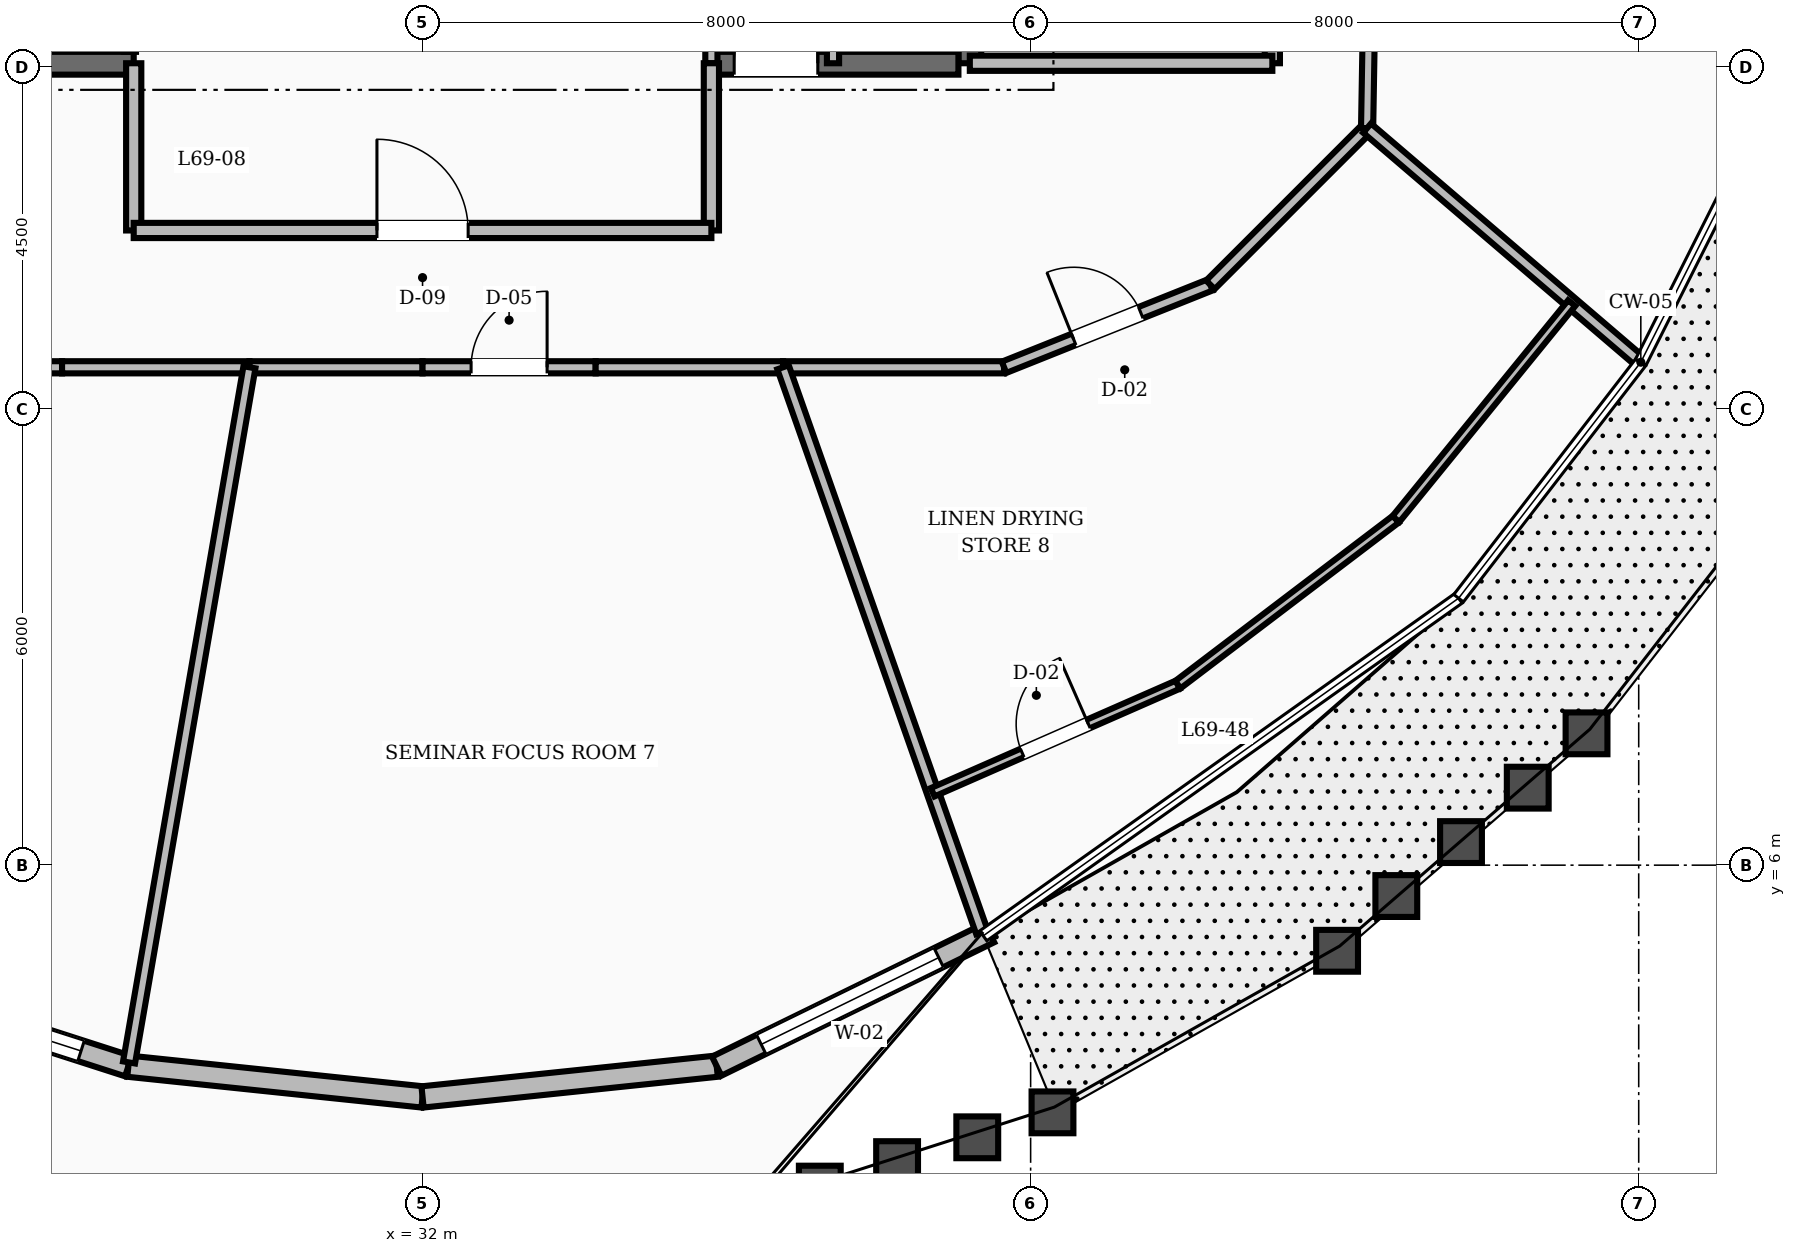
"""IFC4 building model, lengths in metres.
Left out: names, types, materials, properties, quantities, classifications, styles, units other than length and angle.
Written with IfcOpenShell. Run it as: python <this file> out.ifc"""

import sys

from ifc_helpers import new_model, si_unit, direction, frame, frame_2d, origin, place, context, subcontext, project, spatial, rectangle, extrude, element, fill, save


model = new_model("IFC4")
c1 = context("Model", 3, precision=1e-05, world=origin(), true_north=direction((0.0, 1.0)))
c2 = subcontext(c1, "Body", "Model", "MODEL_VIEW")
j1 = project(units=[si_unit("LENGTHUNIT", "METRE"), si_unit("PLANEANGLEUNIT", "RADIAN")], contexts=[c1])
p1 = place(None, origin())
s1 = spatial("IfcSite", under=j1, at=p1, CompositionType="ELEMENT")
p2 = place(p1, origin())
s2 = spatial("IfcBuilding", under=s1, at=p2, CompositionType="ELEMENT")
p3 = place(p2, frame((0.0, 0.0, 265.2)))
s3 = spatial("IfcBuildingStorey", under=s2, at=p3, CompositionType="ELEMENT", Elevation=265.2)
p4 = place(p3, frame((39.2, 16.55, 0.0), z_axis=(0.0, 0.0, 1.0), x_axis=(0.0, 1.0, 0.0)))
e1 = element("IfcWall", 1, at=p4, inside=s3, PredefinedType="SHEAR", context=c2, shape_type="SweptSolid", body=[
    extrude(rectangle(XDim=6.3, YDim=0.3, at=frame_2d((3.15, 0.0))), origin(), (0.0, 0.0, 1.0), 3.6),
])
p5 = place(p3, frame((24.95, 16.55, 0.0), z_axis=(0.0, 0.0, 1.0), x_axis=(1.0, 0.0, 0.0)))
e2 = element("IfcWall", 2, at=p5, inside=s3, PredefinedType="SHEAR", context=c2, shape_type="SweptSolid", body=[
    extrude(rectangle(XDim=3.25, YDim=0.3, at=frame_2d((1.625, 0.0))), origin(), (0.0, 0.0, 1.0), 3.6),
])
p6 = place(p3, frame((35.8, 16.55, 0.0), z_axis=(0.0, 0.0, 1.0), x_axis=(1.0, 0.0, 0.0)))
e3 = element("IfcWall", 3, at=p6, inside=s3, PredefinedType="SHEAR", context=c2, shape_type="SweptSolid", body=[
    extrude(rectangle(XDim=3.25, YDim=0.3, at=frame_2d((1.625, 0.0))), origin(), (0.0, 0.0, 1.0), 3.6),
])
p7 = place(p6, frame((0.3, 0.0, 0.0)))
e4 = element("IfcOpeningElement", 4, at=p7, cuts=e3, PredefinedType="OPENING", context=c2, shape_type="SweptSolid", body=[
    extrude(rectangle(XDim=1.1, YDim=2.1, at=frame_2d((0.55, 1.05))), frame((0.0, 0.16, 0.0), z_axis=(0.0, -1.0, 0.0), x_axis=(1.0, 0.0, 0.0)), (0.0, 0.0, 1.0), 0.32),
])
p8 = place(p3, frame((24.409, 4.553, 0.0), z_axis=(0.0, 0.0, 1.0), x_axis=(0.951905022268, -0.306393258053, 0.0)))
e5 = element("IfcWall", 5, at=p8, inside=s3, PredefinedType="STANDARD", context=c2, shape_type="SweptSolid", body=[
    extrude(rectangle(XDim=3.909, YDim=0.28, at=frame_2d((1.955, 0.0))), origin(), (0.0, 0.0, 1.0), 2.88),
])
p9 = place(p8, frame((0.655, 0.0, 0.8)))
e6 = element("IfcOpeningElement", 6, at=p9, cuts=e5, PredefinedType="OPENING", context=c2, shape_type="SweptSolid", body=[
    extrude(rectangle(XDim=2.6, YDim=1.65, at=frame_2d((1.3, 0.825))), frame((0.0, 0.15, 0.0), z_axis=(0.0, -1.0, 0.0), x_axis=(1.0, 0.0, 0.0)), (0.0, 0.0, 1.0), 0.3),
])
for number, where, z_axis, x_axis in (
    (7, (28.13, 3.355, 0.0), (0.0, 0.0, 1.0), (0.995, -0.104, 0.0)),
    (8, (32.0, 2.951, 0.0), (0.0, 0.0, 1.0), (0.995, 0.104, 0.0)),
):
    element("IfcWall", number, at=place(p3, frame(where, z_axis=z_axis, x_axis=x_axis)), inside=s3, PredefinedType="STANDARD", context=c2, shape_type="SweptSolid", body=[
        extrude(rectangle(XDim=3.891, YDim=0.28, at=frame_2d((1.945, 0.0))), origin(), (0.0, 0.0, 1.0), 2.88),
    ])
p10 = place(p3, frame((35.87, 3.355, 0.0), z_axis=(0.0, 0.0, 1.0), x_axis=(0.898339353793, 0.439302180084, 0.0)))
e9 = element("IfcWall", 9, at=p10, inside=s3, PredefinedType="STANDARD", context=c2, shape_type="SweptSolid", body=[
    extrude(rectangle(XDim=3.996, YDim=0.28, at=frame_2d((1.998, 0.0))), origin(), (0.0, 0.0, 1.0), 2.88),
])
p11 = place(p10, frame((0.652, 0.0, 0.8)))
e10 = element("IfcOpeningElement", 10, at=p11, cuts=e9, PredefinedType="OPENING", context=c2, shape_type="SweptSolid", body=[
    extrude(rectangle(XDim=2.6, YDim=1.65, at=frame_2d((1.3, 0.825))), frame((0.0, 0.15, 0.0), z_axis=(0.0, -1.0, 0.0), x_axis=(1.0, 0.0, 0.0)), (0.0, 0.0, 1.0), 0.3),
])
p12 = place(p3, frame((43.18, 16.55, 0.0), z_axis=(0.0, 0.0, 1.0), x_axis=(0.0, 1.0, 0.0)))
e11 = element("IfcWall", 11, at=p12, inside=s3, PredefinedType="SOLIDWALL", context=c2, shape_type="SweptSolid", body=[
    extrude(rectangle(XDim=2.73, YDim=0.2, at=frame_2d((1.365, 0.0))), origin(), (0.0, 0.0, 1.0), 2.87),
])
p13 = place(p12, frame((0.89, 0.0, 0.0)))
e12 = element("IfcOpeningElement", 12, at=p13, cuts=e11, PredefinedType="OPENING", context=c2, shape_type="SweptSolid", body=[
    extrude(rectangle(XDim=0.95, YDim=2.1, at=frame_2d((0.475, 1.05))), frame((0.0, 0.11, 0.0), z_axis=(0.0, -1.0, 0.0), x_axis=(1.0, 0.0, 0.0)), (0.0, 0.0, 1.0), 0.22),
])
p14 = place(p3, frame((39.2, 16.55, 0.0), z_axis=(0.0, 0.0, 1.0), x_axis=(1.0, 0.0, 0.0)))
e13 = element("IfcWall", 13, at=p14, inside=s3, PredefinedType="SOLIDWALL", context=c2, shape_type="SweptSolid", body=[
    extrude(rectangle(XDim=3.98, YDim=0.2, at=frame_2d((1.99, 0.0))), origin(), (0.0, 0.0, 1.0), 2.87),
])
p15 = place(p3, frame((35.8, 16.55, 0.0), z_axis=(0.0, 0.0, 1.0), x_axis=(0.0, 1.0, 0.0)))
e14 = element("IfcWall", 14, at=p15, inside=s3, PredefinedType="SOLIDWALL", context=c2, shape_type="SweptSolid", body=[
    extrude(rectangle(XDim=3.3, YDim=0.16, at=frame_2d((1.65, 0.0))), origin(), (0.0, 0.0, 1.0), 2.87),
])
p16 = place(p3, frame((37.4, 16.55, 0.0), z_axis=(0.0, 0.0, 1.0), x_axis=(0.0, 1.0, 0.0)))
e15 = element("IfcWall", 15, at=p16, inside=s3, PredefinedType="SOLIDWALL", context=c2, shape_type="SweptSolid", body=[
    extrude(rectangle(XDim=1.75, YDim=0.16, at=frame_2d((0.875, 0.0))), origin(), (0.0, 0.0, 1.0), 2.87),
])
for number, where, z_axis, x_axis in (
    (16, (28.2, 14.35, 0.0), (0.0, 0.0, 1.0), (0.0, 1.0, 0.0)),
    (17, (35.8, 14.35, 0.0), (0.0, 0.0, 1.0), (0.0, 1.0, 0.0)),
):
    element("IfcWall", number, at=place(p3, frame(where, z_axis=z_axis, x_axis=x_axis)), inside=s3, PredefinedType="SOLIDWALL", context=c2, shape_type="SweptSolid", body=[
        extrude(rectangle(XDim=2.2, YDim=0.2, at=frame_2d((1.1, 0.0))), origin(), (0.0, 0.0, 1.0), 2.87),
    ])
p17 = place(p3, frame((28.2, 14.35, 0.0), z_axis=(0.0, 0.0, 1.0), x_axis=(1.0, 0.0, 0.0)))
e18 = element("IfcWall", 18, at=p17, inside=s3, PredefinedType="SOLIDWALL", context=c2, shape_type="SweptSolid", body=[
    extrude(rectangle(XDim=7.6, YDim=0.2, at=frame_2d((3.8, 0.0))), origin(), (0.0, 0.0, 1.0), 2.87),
])
p18 = place(p17, frame((3.2, 0.0, 0.0)))
e19 = element("IfcOpeningElement", 19, at=p18, cuts=e18, PredefinedType="OPENING", context=c2, shape_type="SweptSolid", body=[
    extrude(rectangle(XDim=1.2, YDim=2.1, at=frame_2d((0.6, 1.05))), frame((0.0, 0.11, 0.0), z_axis=(0.0, -1.0, 0.0), x_axis=(1.0, 0.0, 0.0)), (0.0, 0.0, 1.0), 0.22),
])
p19 = place(p3, frame((24.349, 12.55, 0.0), z_axis=(0.0, 0.0, 1.0), x_axis=(1.0, 0.0, 0.0)))
e20 = element("IfcWall", 20, at=p19, inside=s3, PredefinedType="SOLIDWALL", context=c2, shape_type="SweptSolid", body=[
    extrude(rectangle(XDim=2.908, YDim=0.16, at=frame_2d((1.454, 0.0))), origin(), (0.0, 0.0, 1.0), 2.87),
])
p20 = place(p19, frame((0.954, 0.0, 0.0)))
e21 = element("IfcOpeningElement", 21, at=p20, cuts=e20, PredefinedType="OPENING", context=c2, shape_type="SweptSolid", body=[
    extrude(rectangle(XDim=1.0, YDim=2.1, at=frame_2d((0.5, 1.05))), frame((0.0, 0.09, 0.0), z_axis=(0.0, -1.0, 0.0), x_axis=(1.0, 0.0, 0.0)), (0.0, 0.0, 1.0), 0.18),
])
p21 = place(p3, frame((27.257, 12.55, 0.0), z_axis=(0.0, 0.0, 1.0), x_axis=(1.0, 0.0, 0.0)))
e22 = element("IfcWall", 22, at=p21, inside=s3, PredefinedType="SOLIDWALL", context=c2, shape_type="SweptSolid", body=[
    extrude(rectangle(XDim=2.465, YDim=0.16, at=frame_2d((1.232, 0.0))), origin(), (0.0, 0.0, 1.0), 2.87),
])
p22 = place(p3, frame((29.722, 12.55, 0.0), z_axis=(0.0, 0.0, 1.0), x_axis=(1.0, 0.0, 0.0)))
e23 = element("IfcWall", 23, at=p22, inside=s3, PredefinedType="SOLIDWALL", context=c2, shape_type="SweptSolid", body=[
    extrude(rectangle(XDim=2.278, YDim=0.16, at=frame_2d((1.139, 0.0))), origin(), (0.0, 0.0, 1.0), 2.87),
])
p23 = place(p3, frame((32.0, 12.55, 0.0), z_axis=(0.0, 0.0, 1.0), x_axis=(1.0, 0.0, 0.0)))
e24 = element("IfcWall", 24, at=p23, inside=s3, PredefinedType="SOLIDWALL", context=c2, shape_type="SweptSolid", body=[
    extrude(rectangle(XDim=2.278, YDim=0.16, at=frame_2d((1.139, 0.0))), origin(), (0.0, 0.0, 1.0), 2.87),
])
p24 = place(p23, frame((0.639, 0.0, 0.0)))
e25 = element("IfcOpeningElement", 25, at=p24, cuts=e24, PredefinedType="OPENING", context=c2, shape_type="SweptSolid", body=[
    extrude(rectangle(XDim=1.0, YDim=2.1, at=frame_2d((0.5, 1.05))), frame((0.0, 0.09, 0.0), z_axis=(0.0, -1.0, 0.0), x_axis=(1.0, 0.0, 0.0)), (0.0, 0.0, 1.0), 0.18),
])
p25 = place(p3, frame((34.278, 12.55, 0.0), z_axis=(0.0, 0.0, 1.0), x_axis=(1.0, 0.0, 0.0)))
e26 = element("IfcWall", 26, at=p25, inside=s3, PredefinedType="SOLIDWALL", context=c2, shape_type="SweptSolid", body=[
    extrude(rectangle(XDim=2.465, YDim=0.16, at=frame_2d((1.232, 0.0))), origin(), (0.0, 0.0, 1.0), 2.87),
])
p26 = place(p3, frame((36.743, 12.55, 0.0), z_axis=(0.0, 0.0, 1.0), x_axis=(1.0, 0.0, 0.0)))
e27 = element("IfcWall", 27, at=p26, inside=s3, PredefinedType="SOLIDWALL", context=c2, shape_type="SweptSolid", body=[
    extrude(rectangle(XDim=2.908, YDim=0.16, at=frame_2d((1.454, 0.0))), origin(), (0.0, 0.0, 1.0), 2.87),
])
p27 = place(p3, frame((39.651, 12.55, 0.0), z_axis=(0.0, 0.0, 1.0), x_axis=(0.92856882165, 0.371160266542, 0.0)))
e28 = element("IfcWall", 28, at=p27, inside=s3, PredefinedType="SOLIDWALL", context=c2, shape_type="SweptSolid", body=[
    extrude(rectangle(XDim=2.923, YDim=0.16, at=frame_2d((1.461, 0.0))), origin(), (0.0, 0.0, 1.0), 2.87),
])
p28 = place(p27, frame((0.987, 0.0, 0.0)))
e29 = element("IfcOpeningElement", 29, at=p28, cuts=e28, PredefinedType="OPENING", context=c2, shape_type="SweptSolid", body=[
    extrude(rectangle(XDim=0.95, YDim=2.1, at=frame_2d((0.475, 1.05))), frame((0.0, 0.09, 0.0), z_axis=(0.0, -1.0, 0.0), x_axis=(1.0, 0.0, 0.0)), (0.0, 0.0, 1.0), 0.18),
])
p29 = place(p3, frame((42.365, 13.635, 0.0), z_axis=(0.0, 0.0, 1.0), x_axis=(0.707106781187, 0.707106781187, 0.0)))
e30 = element("IfcWall", 30, at=p29, inside=s3, PredefinedType="SOLIDWALL", context=c2, shape_type="SweptSolid", body=[
    extrude(rectangle(XDim=2.916, YDim=0.16, at=frame_2d((1.458, 0.0))), origin(), (0.0, 0.0, 1.0), 2.87),
])
p30 = place(p3, frame((44.427, 15.697, 0.0), z_axis=(0.0, 0.0, 1.0), x_axis=(0.016981035134, 0.999855811828, 0.0)))
e31 = element("IfcWall", 31, at=p30, inside=s3, PredefinedType="SOLIDWALL", context=c2, shape_type="SweptSolid", body=[
    extrude(rectangle(XDim=3.134, YDim=0.16, at=frame_2d((1.567, 0.0))), origin(), (0.0, 0.0, 1.0), 2.87),
])
p31 = place(p3, frame((44.427, 15.697, 0.0), z_axis=(0.0, 0.0, 1.0), x_axis=(0.759954557094, -0.649976208143, 0.0)))
e32 = element("IfcWall", 32, at=p31, inside=s3, PredefinedType="SOLIDWALL", context=c2, shape_type="SweptSolid", body=[
    extrude(rectangle(XDim=4.688, YDim=0.16, at=frame_2d((2.344, 0.0))), origin(), (0.0, 0.0, 1.0), 2.87),
])
p32 = place(p3, frame((29.722, 12.55, 0.0), z_axis=(0.0, 0.0, 1.0), x_axis=(-0.170636222974, -0.985334095325, 0.0)))
e33 = element("IfcWall", 33, at=p32, inside=s3, PredefinedType="SOLIDWALL", context=c2, shape_type="SweptSolid", body=[
    extrude(rectangle(XDim=9.281, YDim=0.16, at=frame_2d((4.641, 0.0))), origin(), (0.0, 0.0, 1.0), 2.87),
])
p33 = place(p3, frame((36.743, 12.55, 0.0), z_axis=(0.0, 0.0, 1.0), x_axis=(0.332170155592, -0.94321948015, 0.0)))
e34 = element("IfcWall", 34, at=p33, inside=s3, PredefinedType="SOLIDWALL", context=c2, shape_type="SweptSolid", body=[
    extrude(rectangle(XDim=7.88, YDim=0.16, at=frame_2d((3.94, 0.0))), origin(), (0.0, 0.0, 1.0), 2.87),
])
p34 = place(p3, frame((38.712, 6.959, 0.0), z_axis=(0.0, 0.0, 1.0), x_axis=(0.91571930983, 0.40181854811, 0.0)))
e35 = element("IfcWall", 35, at=p34, inside=s3, PredefinedType="PARTITIONING", context=c2, shape_type="SweptSolid", body=[
    extrude(rectangle(XDim=3.522, YDim=0.12, at=frame_2d((1.761, 0.0))), origin(), (0.0, 0.0, 1.0), 2.87),
])
p35 = place(p34, frame((1.286, 0.0, 0.0)))
e36 = element("IfcOpeningElement", 36, at=p35, cuts=e35, PredefinedType="OPENING", context=c2, shape_type="SweptSolid", body=[
    extrude(rectangle(XDim=0.95, YDim=2.1, at=frame_2d((0.475, 1.05))), frame((0.0, 0.07, 0.0), z_axis=(0.0, -1.0, 0.0), x_axis=(1.0, 0.0, 0.0)), (0.0, 0.0, 1.0), 0.14),
])
p36 = place(p3, frame((41.937, 8.375, 0.0), z_axis=(0.0, 0.0, 1.0), x_axis=(0.796382845292, 0.604792827111, 0.0)))
e37 = element("IfcWall", 37, at=p36, inside=s3, PredefinedType="PARTITIONING", context=c2, shape_type="SweptSolid", body=[
    extrude(rectangle(XDim=3.602, YDim=0.12, at=frame_2d((1.801, 0.0))), origin(), (0.0, 0.0, 1.0), 2.87),
])
p37 = place(p3, frame((44.806, 10.553, 0.0), z_axis=(0.0, 0.0, 1.0), x_axis=(0.63123970245, 0.775587801638, 0.0)))
e38 = element("IfcWall", 38, at=p37, inside=s3, PredefinedType="PARTITIONING", context=c2, shape_type="SweptSolid", body=[
    extrude(rectangle(XDim=3.663, YDim=0.12, at=frame_2d((1.832, 0.0))), origin(), (0.0, 0.0, 1.0), 2.87),
])
p38 = place(p9, origin())
e39 = element("IfcWindow", 39, at=p38, inside=s3, PartitioningType="SINGLE_PANEL", PredefinedType="WINDOW", context=c2, shape_type="SweptSolid", body=[
    extrude(rectangle(XDim=2.6, YDim=1.65, at=frame_2d((1.3, 0.825))), frame((0.0, 0.03, 0.0), z_axis=(0.0, -1.0, 0.0), x_axis=(1.0, 0.0, 0.0)), (0.0, 0.0, 1.0), 0.06),
])
fill(e6, e39)
p39 = place(p11, origin())
e40 = element("IfcWindow", 40, at=p39, inside=s3, PartitioningType="SINGLE_PANEL", PredefinedType="WINDOW", context=c2, shape_type="SweptSolid", body=[
    extrude(rectangle(XDim=2.6, YDim=1.65, at=frame_2d((1.3, 0.825))), frame((0.0, 0.03, 0.0), z_axis=(0.0, -1.0, 0.0), x_axis=(1.0, 0.0, 0.0)), (0.0, 0.0, 1.0), 0.06),
])
fill(e10, e40)
p40 = place(p7, origin())
e41 = element("IfcDoor", 41, at=p40, inside=s3, OperationType="SINGLE_SWING_RIGHT", PredefinedType="DOOR", context=c2, shape_type="SweptSolid", body=[
    extrude(rectangle(XDim=1.1, YDim=2.1, at=frame_2d((0.55, 1.05))), frame((0.0, 0.025, 0.0), z_axis=(0.0, -1.0, 0.0), x_axis=(1.0, 0.0, 0.0)), (0.0, 0.0, 1.0), 0.05),
])
fill(e4, e41)
p41 = place(p18, origin())
e42 = element("IfcDoor", 42, at=p41, inside=s3, OperationType="SINGLE_SWING_LEFT", PredefinedType="DOOR", context=c2, shape_type="SweptSolid", body=[
    extrude(rectangle(XDim=1.2, YDim=2.1, at=frame_2d((0.6, 1.05))), frame((0.0, 0.025, 0.0), z_axis=(0.0, -1.0, 0.0), x_axis=(1.0, 0.0, 0.0)), (0.0, 0.0, 1.0), 0.05),
])
fill(e19, e42)
p42 = place(p24, origin())
e43 = element("IfcDoor", 43, at=p42, inside=s3, OperationType="SINGLE_SWING_RIGHT", PredefinedType="DOOR", context=c2, shape_type="SweptSolid", body=[
    extrude(rectangle(XDim=1.0, YDim=2.1, at=frame_2d((0.5, 1.05))), frame((0.0, 0.025, 0.0), z_axis=(0.0, -1.0, 0.0), x_axis=(1.0, 0.0, 0.0)), (0.0, 0.0, 1.0), 0.05),
])
fill(e25, e43)
p43 = place(p28, origin())
e44 = element("IfcDoor", 44, at=p43, inside=s3, OperationType="SINGLE_SWING_LEFT", PredefinedType="DOOR", context=c2, shape_type="SweptSolid", body=[
    extrude(rectangle(XDim=0.95, YDim=2.1, at=frame_2d((0.475, 1.05))), frame((0.0, 0.025, 0.0), z_axis=(0.0, -1.0, 0.0), x_axis=(1.0, 0.0, 0.0)), (0.0, 0.0, 1.0), 0.05),
])
fill(e29, e44)
p44 = place(p35, origin())
e45 = element("IfcDoor", 45, at=p44, inside=s3, OperationType="SINGLE_SWING_RIGHT", PredefinedType="DOOR", context=c2, shape_type="SweptSolid", body=[
    extrude(rectangle(XDim=0.95, YDim=2.1, at=frame_2d((0.475, 1.05))), frame((0.0, 0.025, 0.0), z_axis=(0.0, -1.0, 0.0), x_axis=(1.0, 0.0, 0.0)), (0.0, 0.0, 1.0), 0.05),
])
fill(e36, e45)
save(model, sys.argv[1])
